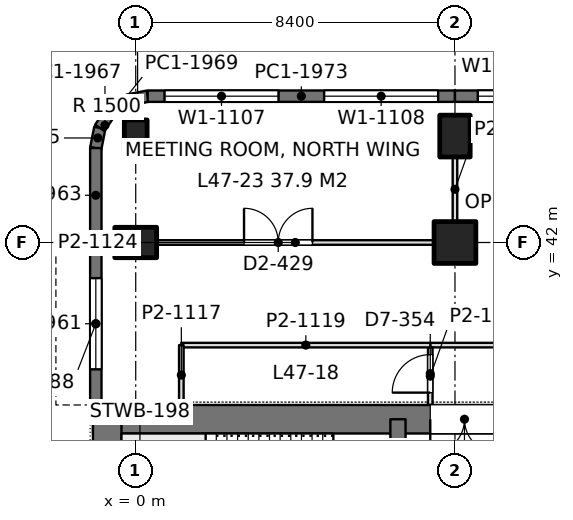
"""IFC4 building model, lengths in metres.
Left out: names, types, materials, properties, quantities, classifications, styles, units other than length and angle.
Written with IfcOpenShell. Run it as: python <this file> out.ifc"""

import sys

from ifc_helpers import new_model, si_unit, direction, frame, frame_2d, origin, origin_2d, place, context, subcontext, project, spatial, rectangle, extrude, element, fill, save


model = new_model("IFC4")
c1 = context("Model", 3, precision=1e-05, world=origin(), true_north=direction((0.0, 1.0)))
c2 = subcontext(c1, "Body", "Model", "MODEL_VIEW")
j1 = project(units=[si_unit("LENGTHUNIT", "METRE"), si_unit("PLANEANGLEUNIT", "RADIAN")], contexts=[c1])
p1 = place(None, origin())
s1 = spatial("IfcSite", under=j1, at=p1, CompositionType="ELEMENT")
p2 = place(p1, origin())
s2 = spatial("IfcBuilding", under=s1, at=p2, CompositionType="ELEMENT")
p3 = place(p2, frame((0.0, 0.0, 207.0)))
s3 = spatial("IfcBuildingStorey", under=s2, at=p3, CompositionType="ELEMENT", Elevation=207.0)
p4 = place(p3, frame((0.0, 42.0, 0.0), z_axis=(0.0, 0.0, 1.0), x_axis=(0.0, 1.0, 0.0)))
e1 = element("IfcColumn", 1, at=p4, inside=s3, PredefinedType="COLUMN", context=c2, shape_type="SweptSolid", body=[
    extrude(rectangle(XDim=0.8, YDim=1.1, at=origin_2d()), origin(), (0.0, 0.0, 1.0), 4.2),
])
p5 = place(p3, frame((0.0, 44.8, 0.0), z_axis=(0.0, 0.0, 1.0), x_axis=(1.0, 0.0, 0.0)))
e2 = element("IfcColumn", 2, at=p5, inside=s3, PredefinedType="COLUMN", context=c2, shape_type="SweptSolid", body=[
    extrude(rectangle(XDim=0.6, YDim=0.85, at=origin_2d()), origin(), (0.0, 0.0, 1.0), 4.2),
])
p6 = place(p3, frame((8.4, 42.0, 0.0), z_axis=(0.0, 0.0, 1.0), x_axis=(1.0, 0.0, 0.0)))
e3 = element("IfcColumn", 3, at=p6, inside=s3, PredefinedType="COLUMN", context=c2, shape_type="SweptSolid", body=[
    extrude(rectangle(XDim=1.1, YDim=1.1, at=origin_2d()), origin(), (0.0, 0.0, 1.0), 4.2),
])
p7 = place(p3, frame((8.4, 44.8, 0.0), z_axis=(0.0, 0.0, 1.0), x_axis=(1.0, 0.0, 0.0)))
e4 = element("IfcColumn", 4, at=p7, inside=s3, PredefinedType="COLUMN", context=c2, shape_type="SweptSolid", body=[
    extrude(rectangle(XDim=0.8, YDim=1.1, at=origin_2d()), origin(), (0.0, 0.0, 1.0), 4.2),
])
p8 = place(p3, frame((-1.125, 37.35, 0.0), z_axis=(0.0, 0.0, 1.0), x_axis=(1.0, 0.0, 0.0)))
e5 = element("IfcWall", 5, at=p8, inside=s3, PredefinedType="SHEAR", context=c2, shape_type="SweptSolid", body=[
    extrude(rectangle(XDim=17.85, YDim=0.75, at=frame_2d((8.925, 0.0))), origin(), (0.0, 0.0, 1.0), 4.2),
])
p9 = place(p8, frame((8.875, 0.0, 0.0)))
e6 = element("IfcOpeningElement", 6, at=p9, cuts=e5, PredefinedType="OPENING", context=c2, shape_type="SweptSolid", body=[
    extrude(rectangle(XDim=1.8, YDim=2.4, at=frame_2d((0.9, 1.2))), frame((0.0, 0.385, 0.0), z_axis=(0.0, -1.0, 0.0), x_axis=(1.0, 0.0, 0.0)), (0.0, 0.0, 1.0), 0.77),
])
p10 = place(p3, frame((-0.75, 13.05, 0.0), z_axis=(0.0, 0.0, 1.0), x_axis=(0.0, 1.0, 0.0)))
e7 = element("IfcWall", 7, at=p10, inside=s3, PredefinedType="SHEAR", context=c2, shape_type="SweptSolid", body=[
    extrude(rectangle(XDim=24.3, YDim=0.75, at=frame_2d((12.15, 0.0))), origin(), (0.0, 0.0, 1.0), 4.2),
])
p11 = place(p3, frame((6.9, 13.05, 0.0), z_axis=(0.0, 0.0, 1.0), x_axis=(0.0, 1.0, 0.0)))
e8 = element("IfcWall", 8, at=p11, inside=s3, PredefinedType="SHEAR", context=c2, shape_type="SweptSolid", body=[
    extrude(rectangle(XDim=24.3, YDim=0.4, at=frame_2d((12.15, 0.0))), origin(), (0.0, 0.0, 1.0), 4.2),
])
p12 = place(p11, frame((1.3, 0.0, 0.0)))
e9 = element("IfcOpeningElement", 9, at=p12, cuts=e8, PredefinedType="OPENING", context=c2, shape_type="SweptSolid", body=[
    extrude(rectangle(XDim=1.0, YDim=2.2, at=frame_2d((0.5, 1.1))), frame((0.0, 0.21, 0.0), z_axis=(0.0, -1.0, 0.0), x_axis=(1.0, 0.0, 0.0)), (0.0, 0.0, 1.0), 0.42),
])
p13 = place(p11, frame((22.0, 0.0, 0.0)))
e10 = element("IfcOpeningElement", 10, at=p13, cuts=e8, PredefinedType="OPENING", context=c2, shape_type="SweptSolid", body=[
    extrude(rectangle(XDim=1.0, YDim=2.2, at=frame_2d((0.5, 1.1))), frame((0.0, 0.21, 0.0), z_axis=(0.0, -1.0, 0.0), x_axis=(1.0, 0.0, 0.0)), (0.0, 0.0, 1.0), 0.42),
])
p14 = place(p11, frame((5.55, 0.0, 0.0)))
e11 = element("IfcOpeningElement", 11, at=p14, cuts=e8, PredefinedType="OPENING", context=c2, shape_type="SweptSolid", body=[
    extrude(rectangle(XDim=1.0, YDim=2.2, at=frame_2d((0.5, 1.1))), frame((0.0, 0.21, 0.0), z_axis=(0.0, -1.0, 0.0), x_axis=(1.0, 0.0, 0.0)), (0.0, 0.0, 1.0), 0.42),
])
p15 = place(p11, frame((9.55, 0.0, 0.0)))
e12 = element("IfcOpeningElement", 12, at=p15, cuts=e8, PredefinedType="OPENING", context=c2, shape_type="SweptSolid", body=[
    extrude(rectangle(XDim=1.0, YDim=2.2, at=frame_2d((0.5, 1.1))), frame((0.0, 0.21, 0.0), z_axis=(0.0, -1.0, 0.0), x_axis=(1.0, 0.0, 0.0)), (0.0, 0.0, 1.0), 0.42),
])
p16 = place(p11, frame((12.8, 0.0, 0.0)))
e13 = element("IfcOpeningElement", 13, at=p16, cuts=e8, PredefinedType="OPENING", context=c2, shape_type="SweptSolid", body=[
    extrude(rectangle(XDim=1.1, YDim=2.2, at=frame_2d((0.55, 1.1))), frame((0.0, 0.21, 0.0), z_axis=(0.0, -1.0, 0.0), x_axis=(1.0, 0.0, 0.0)), (0.0, 0.0, 1.0), 0.42),
])
p17 = place(p11, frame((15.538, 0.0, 0.0)))
e14 = element("IfcOpeningElement", 14, at=p17, cuts=e8, PredefinedType="OPENING", context=c2, shape_type="SweptSolid", body=[
    extrude(rectangle(XDim=1.1, YDim=2.2, at=frame_2d((0.55, 1.1))), frame((0.0, 0.21, 0.0), z_axis=(0.0, -1.0, 0.0), x_axis=(1.0, 0.0, 0.0)), (0.0, 0.0, 1.0), 0.42),
])
p18 = place(p11, frame((18.262, 0.0, 0.0)))
e15 = element("IfcOpeningElement", 15, at=p18, cuts=e8, PredefinedType="OPENING", context=c2, shape_type="SweptSolid", body=[
    extrude(rectangle(XDim=1.1, YDim=2.2, at=frame_2d((0.55, 1.1))), frame((0.0, 0.21, 0.0), z_axis=(0.0, -1.0, 0.0), x_axis=(1.0, 0.0, 0.0)), (0.0, 0.0, 1.0), 0.42),
])
p19 = place(p3, frame((-1.05, 37.725, 0.0), z_axis=(0.0, 0.0, 1.0), x_axis=(0.0, 1.0, 0.0)))
e16 = element("IfcWall", 16, at=p19, inside=s3, PredefinedType="SOLIDWALL", context=c2, shape_type="SweptSolid", body=[
    extrude(rectangle(XDim=4.275, YDim=0.3, at=frame_2d((2.137, 0.0))), origin(), (0.0, 0.0, 1.0), 4.05),
])
p20 = place(p19, frame((0.938, 0.0, 0.9)))
e17 = element("IfcOpeningElement", 17, at=p20, cuts=e16, PredefinedType="OPENING", context=c2, shape_type="SweptSolid", body=[
    extrude(rectangle(XDim=2.4, YDim=1.9, at=frame_2d((1.2, 0.95))), frame((0.0, 0.16, 0.0), z_axis=(0.0, -1.0, 0.0), x_axis=(1.0, 0.0, 0.0)), (0.0, 0.0, 1.0), 0.32),
])
p21 = place(p3, frame((-1.05, 42.0, 0.0), z_axis=(0.0, 0.0, 1.0), x_axis=(0.0, 1.0, 0.0)))
e18 = element("IfcWall", 18, at=p21, inside=s3, PredefinedType="SOLIDWALL", context=c2, shape_type="SweptSolid", body=[
    extrude(rectangle(XDim=2.485, YDim=0.3, at=frame_2d((1.243, 0.0))), origin(), (0.0, 0.0, 1.0), 4.05),
])
p22 = place(p3, frame((-1.05, 44.485, 0.0), z_axis=(0.0, 0.0, 1.0), x_axis=(0.195073962632, 0.980788534345, 0.0)))
e19 = element("IfcWall", 19, at=p22, inside=s3, PredefinedType="SOLIDWALL", context=c2, shape_type="SweptSolid", body=[
    extrude(rectangle(XDim=0.541, YDim=0.3, at=frame_2d((0.271, 0.0))), origin(), (0.0, 0.0, 1.0), 4.05),
])
p23 = place(p3, frame((-0.945, 45.015, 0.0), z_axis=(0.0, 0.0, 1.0), x_axis=(0.55534295404, 0.831621430339, 0.0)))
e20 = element("IfcWall", 20, at=p23, inside=s3, PredefinedType="SOLIDWALL", context=c2, shape_type="SweptSolid", body=[
    extrude(rectangle(XDim=0.526, YDim=0.3, at=frame_2d((0.263, 0.0))), origin(), (0.0, 0.0, 1.0), 4.05),
])
p24 = place(p3, frame((-0.653, 45.453, 0.0), z_axis=(0.0, 0.0, 1.0), x_axis=(0.831692711774, 0.555236195849, 0.0)))
e21 = element("IfcWall", 21, at=p24, inside=s3, PredefinedType="SOLIDWALL", context=c2, shape_type="SweptSolid", body=[
    extrude(rectangle(XDim=0.525, YDim=0.3, at=frame_2d((0.263, 0.0))), origin(), (0.0, 0.0, 1.0), 4.05),
])
p25 = place(p3, frame((-0.216, 45.744, 0.0), z_axis=(0.0, 0.0, 1.0), x_axis=(0.980702050465, 0.1955082817, 0.0)))
e22 = element("IfcWall", 22, at=p25, inside=s3, PredefinedType="SOLIDWALL", context=c2, shape_type="SweptSolid", body=[
    extrude(rectangle(XDim=0.541, YDim=0.3, at=frame_2d((0.271, 0.0))), origin(), (0.0, 0.0, 1.0), 4.05),
])
p26 = place(p3, frame((0.315, 45.85, 0.0), z_axis=(0.0, 0.0, 1.0), x_axis=(1.0, 0.0, 0.0)))
e23 = element("IfcWall", 23, at=p26, inside=s3, PredefinedType="SOLIDWALL", context=c2, shape_type="SweptSolid", body=[
    extrude(rectangle(XDim=8.085, YDim=0.3, at=frame_2d((4.042, 0.0))), origin(), (0.0, 0.0, 1.0), 4.05),
])
p27 = place(p26, frame((0.443, 0.0, 0.9)))
e24 = element("IfcOpeningElement", 24, at=p27, cuts=e23, PredefinedType="OPENING", context=c2, shape_type="SweptSolid", body=[
    extrude(rectangle(XDim=3.0, YDim=1.9, at=frame_2d((1.5, 0.95))), frame((0.0, 0.16, 0.0), z_axis=(0.0, -1.0, 0.0), x_axis=(1.0, 0.0, 0.0)), (0.0, 0.0, 1.0), 0.32),
])
p28 = place(p26, frame((4.643, 0.0, 0.9)))
e25 = element("IfcOpeningElement", 25, at=p28, cuts=e23, PredefinedType="OPENING", context=c2, shape_type="SweptSolid", body=[
    extrude(rectangle(XDim=3.0, YDim=1.9, at=frame_2d((1.5, 0.95))), frame((0.0, 0.16, 0.0), z_axis=(0.0, -1.0, 0.0), x_axis=(1.0, 0.0, 0.0)), (0.0, 0.0, 1.0), 0.32),
])
p29 = place(p3, frame((8.4, 45.85, 0.0), z_axis=(0.0, 0.0, 1.0), x_axis=(1.0, 0.0, 0.0)))
e26 = element("IfcWall", 26, at=p29, inside=s3, PredefinedType="SOLIDWALL", context=c2, shape_type="SweptSolid", body=[
    extrude(rectangle(XDim=8.4, YDim=0.3, at=frame_2d((4.2, 0.0))), origin(), (0.0, 0.0, 1.0), 4.05),
])
p30 = place(p29, frame((0.6, 0.0, 0.9)))
e27 = element("IfcOpeningElement", 27, at=p30, cuts=e26, PredefinedType="OPENING", context=c2, shape_type="SweptSolid", body=[
    extrude(rectangle(XDim=3.0, YDim=1.9, at=frame_2d((1.5, 0.95))), frame((0.0, 0.16, 0.0), z_axis=(0.0, -1.0, 0.0), x_axis=(1.0, 0.0, 0.0)), (0.0, 0.0, 1.0), 0.32),
])
p31 = place(p29, frame((4.8, 0.0, 0.9)))
e28 = element("IfcOpeningElement", 28, at=p31, cuts=e26, PredefinedType="OPENING", context=c2, shape_type="SweptSolid", body=[
    extrude(rectangle(XDim=3.0, YDim=1.9, at=frame_2d((1.5, 0.95))), frame((0.0, 0.16, 0.0), z_axis=(0.0, -1.0, 0.0), x_axis=(1.0, 0.0, 0.0)), (0.0, 0.0, 1.0), 0.32),
])
p32 = place(p3, frame((0.549, 42.0, 0.0), z_axis=(0.0, 0.0, 1.0), x_axis=(1.0, 0.0, 0.0)))
e29 = element("IfcWall", 29, at=p32, inside=s3, PredefinedType="PARTITIONING", context=c2, shape_type="SweptSolid", body=[
    extrude(rectangle(XDim=7.302, YDim=0.12, at=frame_2d((3.651, 0.0))), origin(), (0.0, 0.0, 1.0), 3.55),
])
p33 = place(p32, frame((2.301, 0.0, 0.0)))
e30 = element("IfcOpeningElement", 30, at=p33, cuts=e29, PredefinedType="OPENING", context=c2, shape_type="SweptSolid", body=[
    extrude(rectangle(XDim=1.8, YDim=2.2, at=frame_2d((0.9, 1.1))), frame((0.0, 0.07, 0.0), z_axis=(0.0, -1.0, 0.0), x_axis=(1.0, 0.0, 0.0)), (0.0, 0.0, 1.0), 0.14),
])
p34 = place(p3, frame((8.4, 42.549, 0.0), z_axis=(0.0, 0.0, 1.0), x_axis=(0.0, 1.0, 0.0)))
e31 = element("IfcWall", 31, at=p34, inside=s3, PredefinedType="PARTITIONING", context=c2, shape_type="SweptSolid", body=[
    extrude(rectangle(XDim=1.702, YDim=0.12, at=frame_2d((0.851, 0.0))), origin(), (0.0, 0.0, 1.0), 3.69),
])
p35 = place(p3, frame((7.748, 39.3, 0.0), z_axis=(0.0, 0.0, 1.0), x_axis=(1.0, 0.0, 0.0)))
e32 = element("IfcWall", 32, at=p35, inside=s3, PredefinedType="PARTITIONING", context=c2, shape_type="SweptSolid", body=[
    extrude(rectangle(XDim=34.904, YDim=0.12, at=frame_2d((17.452, 0.0))), origin(), (0.0, 0.0, 1.0), 3.55),
])
p36 = place(p35, frame((2.119, 0.0, 0.0)))
e33 = element("IfcOpeningElement", 33, at=p36, cuts=e32, PredefinedType="OPENING", context=c2, shape_type="SweptSolid", body=[
    extrude(rectangle(XDim=1.8, YDim=2.2, at=frame_2d((0.9, 1.1))), frame((0.0, 0.07, 0.0), z_axis=(0.0, -1.0, 0.0), x_axis=(1.0, 0.0, 0.0)), (0.0, 0.0, 1.0), 0.14),
])
p37 = place(p35, frame((5.135, 0.0, 0.0)))
e34 = element("IfcOpeningElement", 34, at=p37, cuts=e32, PredefinedType="OPENING", context=c2, shape_type="SweptSolid", body=[
    extrude(rectangle(XDim=1.8, YDim=2.2, at=frame_2d((0.9, 1.1))), frame((0.0, 0.07, 0.0), z_axis=(0.0, -1.0, 0.0), x_axis=(1.0, 0.0, 0.0)), (0.0, 0.0, 1.0), 0.14),
])
p38 = place(p35, frame((13.752, 0.0, 0.0)))
e35 = element("IfcOpeningElement", 35, at=p38, cuts=e32, PredefinedType="OPENING", context=c2, shape_type="SweptSolid", body=[
    extrude(rectangle(XDim=1.8, YDim=2.2, at=frame_2d((0.9, 1.1))), frame((0.0, 0.07, 0.0), z_axis=(0.0, -1.0, 0.0), x_axis=(1.0, 0.0, 0.0)), (0.0, 0.0, 1.0), 0.14),
])
p39 = place(p35, frame((19.352, 0.0, 0.0)))
e36 = element("IfcOpeningElement", 36, at=p39, cuts=e32, PredefinedType="OPENING", context=c2, shape_type="SweptSolid", body=[
    extrude(rectangle(XDim=1.8, YDim=2.2, at=frame_2d((0.9, 1.1))), frame((0.0, 0.07, 0.0), z_axis=(0.0, -1.0, 0.0), x_axis=(1.0, 0.0, 0.0)), (0.0, 0.0, 1.0), 0.14),
])
p40 = place(p35, frame((27.969, 0.0, 0.0)))
e37 = element("IfcOpeningElement", 37, at=p40, cuts=e32, PredefinedType="OPENING", context=c2, shape_type="SweptSolid", body=[
    extrude(rectangle(XDim=1.8, YDim=2.2, at=frame_2d((0.9, 1.1))), frame((0.0, 0.07, 0.0), z_axis=(0.0, -1.0, 0.0), x_axis=(1.0, 0.0, 0.0)), (0.0, 0.0, 1.0), 0.14),
])
p41 = place(p35, frame((30.985, 0.0, 0.0)))
e38 = element("IfcOpeningElement", 38, at=p41, cuts=e32, PredefinedType="OPENING", context=c2, shape_type="SweptSolid", body=[
    extrude(rectangle(XDim=1.8, YDim=2.2, at=frame_2d((0.9, 1.1))), frame((0.0, 0.07, 0.0), z_axis=(0.0, -1.0, 0.0), x_axis=(1.0, 0.0, 0.0)), (0.0, 0.0, 1.0), 0.14),
])
p42 = place(p3, frame((7.75, 37.724, 0.0), z_axis=(0.0, 0.0, 1.0), x_axis=(0.0, 1.0, 0.0)))
e39 = element("IfcWall", 39, at=p42, inside=s3, PredefinedType="PARTITIONING", context=c2, shape_type="SweptSolid", body=[
    extrude(rectangle(XDim=1.518, YDim=0.12, at=frame_2d((0.759, 0.0))), origin(), (0.0, 0.0, 1.0), 4.05),
])
p43 = place(p42, frame((0.326, 0.0, 0.0)))
e40 = element("IfcOpeningElement", 40, at=p43, cuts=e39, PredefinedType="OPENING", context=c2, shape_type="SweptSolid", body=[
    extrude(rectangle(XDim=1.0, YDim=2.4, at=frame_2d((0.5, 1.2))), frame((0.0, 0.07, 0.0), z_axis=(0.0, -1.0, 0.0), x_axis=(1.0, 0.0, 0.0)), (0.0, 0.0, 1.0), 0.14),
])
p44 = place(p3, frame((1.2, 39.3, 0.0), z_axis=(0.0, 0.0, 1.0), x_axis=(1.0, 0.0, 0.0)))
e41 = element("IfcWall", 41, at=p44, inside=s3, PredefinedType="PARTITIONING", context=c2, shape_type="SweptSolid", body=[
    extrude(rectangle(XDim=6.552, YDim=0.12, at=frame_2d((3.276, 0.0))), origin(), (0.0, 0.0, 1.0), 3.69),
])
p45 = place(p3, frame((1.2, 37.724, 0.0), z_axis=(0.0, 0.0, 1.0), x_axis=(0.0, 1.0, 0.0)))
e42 = element("IfcWall", 42, at=p45, inside=s3, PredefinedType="PARTITIONING", context=c2, shape_type="SweptSolid", body=[
    extrude(rectangle(XDim=1.576, YDim=0.12, at=frame_2d((0.788, 0.0))), origin(), (0.0, 0.0, 1.0), 4.05),
])
p46 = place(p20, origin())
e43 = element("IfcWindow", 43, at=p46, inside=s3, PartitioningType="SINGLE_PANEL", PredefinedType="WINDOW", context=c2, shape_type="SweptSolid", body=[
    extrude(rectangle(XDim=2.4, YDim=1.9, at=frame_2d((1.2, 0.95))), frame((0.0, 0.03, 0.0), z_axis=(0.0, -1.0, 0.0), x_axis=(1.0, 0.0, 0.0)), (0.0, 0.0, 1.0), 0.06),
])
fill(e17, e43)
p47 = place(p27, origin())
e44 = element("IfcWindow", 44, at=p47, inside=s3, PartitioningType="SINGLE_PANEL", PredefinedType="WINDOW", context=c2, shape_type="SweptSolid", body=[
    extrude(rectangle(XDim=3.0, YDim=1.9, at=frame_2d((1.5, 0.95))), frame((0.0, 0.03, 0.0), z_axis=(0.0, -1.0, 0.0), x_axis=(1.0, 0.0, 0.0)), (0.0, 0.0, 1.0), 0.06),
])
fill(e24, e44)
p48 = place(p28, origin())
e45 = element("IfcWindow", 45, at=p48, inside=s3, PartitioningType="SINGLE_PANEL", PredefinedType="WINDOW", context=c2, shape_type="SweptSolid", body=[
    extrude(rectangle(XDim=3.0, YDim=1.9, at=frame_2d((1.5, 0.95))), frame((0.0, 0.03, 0.0), z_axis=(0.0, -1.0, 0.0), x_axis=(1.0, 0.0, 0.0)), (0.0, 0.0, 1.0), 0.06),
])
fill(e25, e45)
p49 = place(p30, origin())
e46 = element("IfcWindow", 46, at=p49, inside=s3, PartitioningType="SINGLE_PANEL", PredefinedType="WINDOW", context=c2, shape_type="SweptSolid", body=[
    extrude(rectangle(XDim=3.0, YDim=1.9, at=frame_2d((1.5, 0.95))), frame((0.0, 0.03, 0.0), z_axis=(0.0, -1.0, 0.0), x_axis=(1.0, 0.0, 0.0)), (0.0, 0.0, 1.0), 0.06),
])
fill(e27, e46)
p50 = place(p9, frame((1.8, 0.0, 0.0), z_axis=(0.0, 0.0, 1.0), x_axis=(-1.0, 0.0, 0.0)))
e47 = element("IfcDoor", 47, at=p50, inside=s3, OperationType="DOUBLE_DOOR_SINGLE_SWING", PredefinedType="DOOR", context=c2, shape_type="SweptSolid", body=[
    extrude(rectangle(XDim=1.8, YDim=2.4, at=frame_2d((0.9, 1.2))), frame((0.0, 0.025, 0.0), z_axis=(0.0, -1.0, 0.0), x_axis=(1.0, 0.0, 0.0)), (0.0, 0.0, 1.0), 0.05),
])
fill(e6, e47)
p51 = place(p33, origin())
e48 = element("IfcDoor", 48, at=p51, inside=s3, OperationType="DOUBLE_DOOR_SINGLE_SWING", PredefinedType="DOOR", context=c2, shape_type="SweptSolid", body=[
    extrude(rectangle(XDim=1.8, YDim=2.2, at=frame_2d((0.9, 1.1))), frame((0.0, 0.025, 0.0), z_axis=(0.0, -1.0, 0.0), x_axis=(1.0, 0.0, 0.0)), (0.0, 0.0, 1.0), 0.05),
])
fill(e30, e48)
p52 = place(p43, origin())
e49 = element("IfcDoor", 49, at=p52, inside=s3, OperationType="SINGLE_SWING_LEFT", PredefinedType="DOOR", context=c2, shape_type="SweptSolid", body=[
    extrude(rectangle(XDim=1.0, YDim=2.4, at=frame_2d((0.5, 1.2))), frame((0.0, 0.025, 0.0), z_axis=(0.0, -1.0, 0.0), x_axis=(1.0, 0.0, 0.0)), (0.0, 0.0, 1.0), 0.05),
])
fill(e40, e49)
save(model, sys.argv[1])
